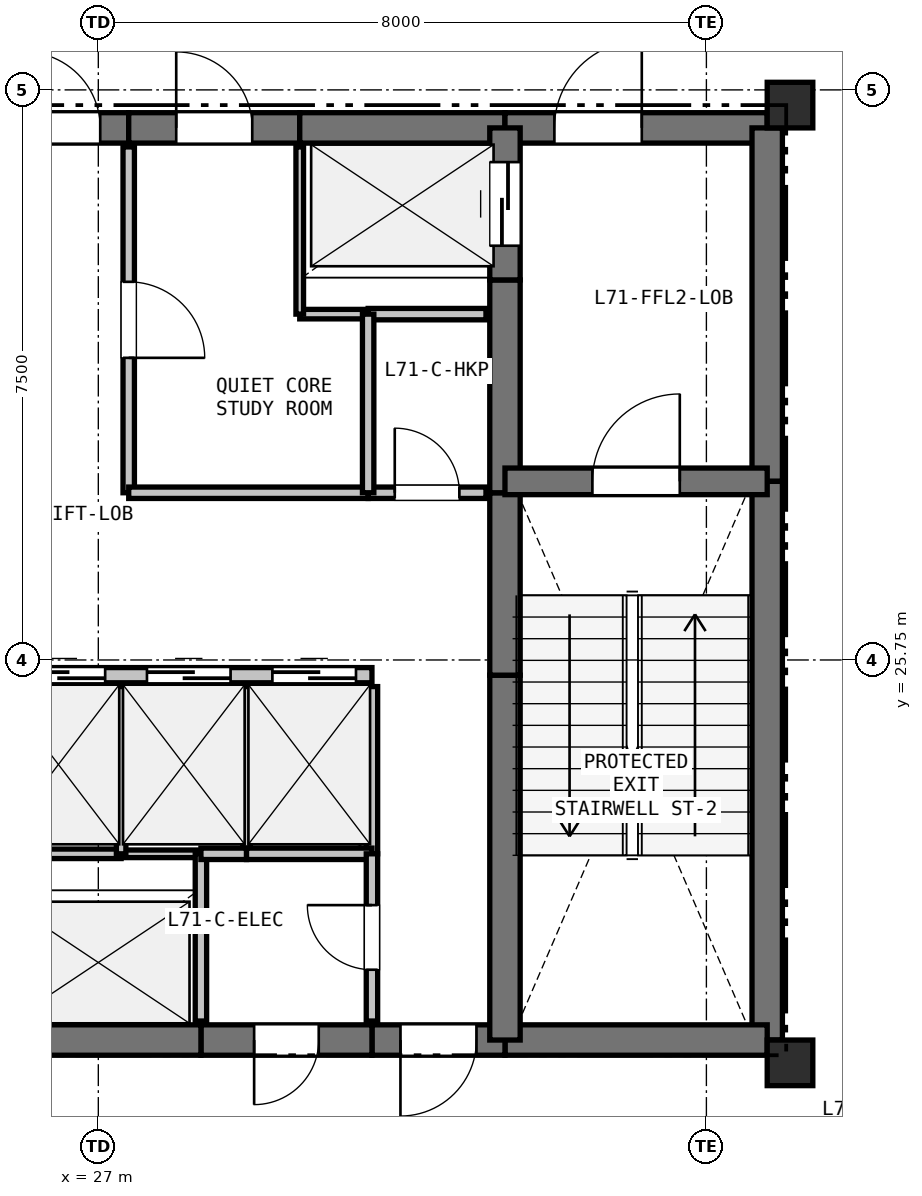
"""IFC4 building model, lengths in metres.
Left out: names, types, materials, properties, quantities, classifications, styles, units other than length and angle.
Written with IfcOpenShell. Run it as: python <this file> out.ifc"""

import sys

from ifc_helpers import new_model, si_unit, direction, frame, frame_2d, origin, origin_2d, place, context, subcontext, project, spatial, rectangle, extrude, element, fill, save


model = new_model("IFC4")
c1 = context("Model", 3, precision=1e-05, world=origin(), true_north=direction((0.0, 1.0)))
c2 = subcontext(c1, "Body", "Model", "MODEL_VIEW")
j1 = project(units=[si_unit("LENGTHUNIT", "METRE"), si_unit("PLANEANGLEUNIT", "RADIAN")], contexts=[c1])
p1 = place(None, origin())
s1 = spatial("IfcSite", under=j1, at=p1, CompositionType="ELEMENT")
p2 = place(p1, origin())
s2 = spatial("IfcBuilding", under=s1, at=p2, CompositionType="ELEMENT")
p3 = place(p2, frame((0.0, 0.0, 254.1)))
s3 = spatial("IfcBuildingStorey", under=s2, at=p3, CompositionType="ELEMENT", Elevation=254.1)
for number, where, z_axis, x_axis in (
    (1, (36.1, 33.05, 0.0), (0.0, 0.0, 1.0), (1.0, 0.0, 0.0)),
    (2, (36.1, 20.45, 0.0), (0.0, 0.0, 1.0), (1.0, 0.0, 0.0)),
):
    element("IfcColumn", number, at=place(p3, frame(where, z_axis=z_axis, x_axis=x_axis)), inside=s3, PredefinedType="COLUMN", context=c2, shape_type="SweptSolid", body=[
        extrude(rectangle(XDim=0.6, YDim=0.6, at=origin_2d()), origin(), (0.0, 0.0, 1.0), 4.5),
    ])
p4 = place(p3, frame((25.65, 32.75, 0.0), z_axis=(0.0, 0.0, 1.0), x_axis=(1.0, 0.0, 0.0)))
e3 = element("IfcWall", 3, at=p4, inside=s3, PredefinedType="SHEAR", context=c2, shape_type="SweptSolid", body=[
    extrude(rectangle(XDim=1.75, YDim=0.4, at=frame_2d((0.875, 0.0))), origin(), (0.0, 0.0, 1.0), 4.18),
])
p5 = place(p4, frame((0.375, 0.0, 0.0)))
e4 = element("IfcOpeningElement", 4, at=p5, cuts=e3, PredefinedType="OPENING", context=c2, shape_type="SweptSolid", body=[
    extrude(rectangle(XDim=1.0, YDim=2.15, at=frame_2d((0.5, 1.075))), frame((0.0, 0.21, 0.0), z_axis=(0.0, -1.0, 0.0), x_axis=(1.0, 0.0, 0.0)), (0.0, 0.0, 1.0), 0.42),
])
p6 = place(p3, frame((27.4, 32.75, 0.0), z_axis=(0.0, 0.0, 1.0), x_axis=(1.0, 0.0, 0.0)))
e5 = element("IfcWall", 5, at=p6, inside=s3, PredefinedType="SHEAR", context=c2, shape_type="SweptSolid", body=[
    extrude(rectangle(XDim=2.25, YDim=0.4, at=frame_2d((1.125, 0.0))), origin(), (0.0, 0.0, 1.0), 4.18),
])
p7 = place(p6, frame((0.625, 0.0, 0.0)))
e6 = element("IfcOpeningElement", 6, at=p7, cuts=e5, PredefinedType="OPENING", context=c2, shape_type="SweptSolid", body=[
    extrude(rectangle(XDim=1.0, YDim=2.15, at=frame_2d((0.5, 1.075))), frame((0.0, 0.21, 0.0), z_axis=(0.0, -1.0, 0.0), x_axis=(1.0, 0.0, 0.0)), (0.0, 0.0, 1.0), 0.42),
])
p8 = place(p3, frame((29.65, 32.75, 0.0), z_axis=(0.0, 0.0, 1.0), x_axis=(1.0, 0.0, 0.0)))
e7 = element("IfcWall", 7, at=p8, inside=s3, PredefinedType="SHEAR", context=c2, shape_type="SweptSolid", body=[
    extrude(rectangle(XDim=2.7, YDim=0.4, at=frame_2d((1.35, 0.0))), origin(), (0.0, 0.0, 1.0), 4.18),
])
p9 = place(p3, frame((32.35, 32.75, 0.0), z_axis=(0.0, 0.0, 1.0), x_axis=(1.0, 0.0, 0.0)))
e8 = element("IfcWall", 8, at=p9, inside=s3, PredefinedType="SHEAR", context=c2, shape_type="SweptSolid", body=[
    extrude(rectangle(XDim=3.45, YDim=0.4, at=frame_2d((1.725, 0.0))), origin(), (0.0, 0.0, 1.0), 4.18),
])
p10 = place(p9, frame((0.65, 0.0, 0.0)))
e9 = element("IfcOpeningElement", 9, at=p10, cuts=e8, PredefinedType="OPENING", context=c2, shape_type="SweptSolid", body=[
    extrude(rectangle(XDim=1.15, YDim=2.15, at=frame_2d((0.575, 1.075))), frame((0.0, 0.21, 0.0), z_axis=(0.0, -1.0, 0.0), x_axis=(1.0, 0.0, 0.0)), (0.0, 0.0, 1.0), 0.42),
])
p11 = place(p3, frame((35.8, 32.75, 0.0), z_axis=(0.0, 0.0, 1.0), x_axis=(0.0, -1.0, 0.0)))
e10 = element("IfcWall", 10, at=p11, inside=s3, PredefinedType="SHEAR", context=c2, shape_type="SweptSolid", body=[
    extrude(rectangle(XDim=4.65, YDim=0.4, at=frame_2d((2.325, 0.0))), origin(), (0.0, 0.0, 1.0), 4.18),
])
p12 = place(p3, frame((35.8, 28.1, 0.0), z_axis=(0.0, 0.0, 1.0), x_axis=(0.0, -1.0, 0.0)))
e11 = element("IfcWall", 11, at=p12, inside=s3, PredefinedType="SHEAR", context=c2, shape_type="SweptSolid", body=[
    extrude(rectangle(XDim=7.35, YDim=0.4, at=frame_2d((3.675, 0.0))), origin(), (0.0, 0.0, 1.0), 4.18),
])
p13 = place(p3, frame((35.8, 20.75, 0.0), z_axis=(0.0, 0.0, 1.0), x_axis=(-1.0, 0.0, 0.0)))
e12 = element("IfcWall", 12, at=p13, inside=s3, PredefinedType="SHEAR", context=c2, shape_type="SweptSolid", body=[
    extrude(rectangle(XDim=3.45, YDim=0.4, at=frame_2d((1.725, 0.0))), origin(), (0.0, 0.0, 1.0), 4.18),
])
p14 = place(p3, frame((32.35, 20.75, 0.0), z_axis=(0.0, 0.0, 1.0), x_axis=(-1.0, 0.0, 0.0)))
e13 = element("IfcWall", 13, at=p14, inside=s3, PredefinedType="SHEAR", context=c2, shape_type="SweptSolid", body=[
    extrude(rectangle(XDim=1.75, YDim=0.4, at=frame_2d((0.875, 0.0))), origin(), (0.0, 0.0, 1.0), 4.18),
])
p15 = place(p14, frame((0.375, 0.0, 0.0)))
e14 = element("IfcOpeningElement", 14, at=p15, cuts=e13, PredefinedType="OPENING", context=c2, shape_type="SweptSolid", body=[
    extrude(rectangle(XDim=1.0, YDim=2.15, at=frame_2d((0.5, 1.075))), frame((0.0, 0.21, 0.0), z_axis=(0.0, -1.0, 0.0), x_axis=(1.0, 0.0, 0.0)), (0.0, 0.0, 1.0), 0.42),
])
p16 = place(p3, frame((30.6, 20.75, 0.0), z_axis=(0.0, 0.0, 1.0), x_axis=(-1.0, 0.0, 0.0)))
e15 = element("IfcWall", 15, at=p16, inside=s3, PredefinedType="SHEAR", context=c2, shape_type="SweptSolid", body=[
    extrude(rectangle(XDim=2.25, YDim=0.4, at=frame_2d((1.125, 0.0))), origin(), (0.0, 0.0, 1.0), 4.18),
])
p17 = place(p16, frame((0.7, 0.0, 0.0)))
e16 = element("IfcOpeningElement", 16, at=p17, cuts=e15, PredefinedType="OPENING", context=c2, shape_type="SweptSolid", body=[
    extrude(rectangle(XDim=0.85, YDim=2.1, at=frame_2d((0.425, 1.05))), frame((0.0, 0.21, 0.0), z_axis=(0.0, -1.0, 0.0), x_axis=(1.0, 0.0, 0.0)), (0.0, 0.0, 1.0), 0.42),
])
p18 = place(p3, frame((28.35, 20.75, 0.0), z_axis=(0.0, 0.0, 1.0), x_axis=(-1.0, 0.0, 0.0)))
e17 = element("IfcWall", 17, at=p18, inside=s3, PredefinedType="SHEAR", context=c2, shape_type="SweptSolid", body=[
    extrude(rectangle(XDim=2.7, YDim=0.4, at=frame_2d((1.35, 0.0))), origin(), (0.0, 0.0, 1.0), 4.18),
])
p19 = place(p3, frame((32.35, 20.75, 0.0), z_axis=(0.0, 0.0, 1.0), x_axis=(0.0, 1.0, 0.0)))
e18 = element("IfcWall", 18, at=p19, inside=s3, PredefinedType="SHEAR", context=c2, shape_type="SweptSolid", body=[
    extrude(rectangle(XDim=4.8, YDim=0.4, at=frame_2d((2.4, 0.0))), origin(), (0.0, 0.0, 1.0), 4.18),
])
p20 = place(p3, frame((32.35, 25.55, 0.0), z_axis=(0.0, 0.0, 1.0), x_axis=(0.0, 1.0, 0.0)))
e19 = element("IfcWall", 19, at=p20, inside=s3, PredefinedType="SHEAR", context=c2, shape_type="SweptSolid", body=[
    extrude(rectangle(XDim=2.4, YDim=0.4, at=frame_2d((1.2, 0.0))), origin(), (0.0, 0.0, 1.0), 4.18),
])
p21 = place(p3, frame((32.35, 27.95, 0.0), z_axis=(0.0, 0.0, 1.0), x_axis=(0.0, 1.0, 0.0)))
e20 = element("IfcWall", 20, at=p21, inside=s3, PredefinedType="SHEAR", context=c2, shape_type="SweptSolid", body=[
    extrude(rectangle(XDim=2.8, YDim=0.4, at=frame_2d((1.4, 0.0))), origin(), (0.0, 0.0, 1.0), 4.18),
])
p22 = place(p3, frame((32.35, 30.75, 0.0), z_axis=(0.0, 0.0, 1.0), x_axis=(0.0, 1.0, 0.0)))
e21 = element("IfcWall", 21, at=p22, inside=s3, PredefinedType="SHEAR", context=c2, shape_type="SweptSolid", body=[
    extrude(rectangle(XDim=2.0, YDim=0.4, at=frame_2d((1.0, 0.0))), origin(), (0.0, 0.0, 1.0), 4.18),
])
p23 = place(p22, frame((0.45, 0.0, 0.0)))
e22 = element("IfcOpeningElement", 22, at=p23, cuts=e21, PredefinedType="OPENING", context=c2, shape_type="SweptSolid", body=[
    extrude(rectangle(XDim=1.1, YDim=2.15, at=frame_2d((0.55, 1.075))), frame((0.0, 0.21, 0.0), z_axis=(0.0, -1.0, 0.0), x_axis=(1.0, 0.0, 0.0)), (0.0, 0.0, 1.0), 0.42),
])
p24 = place(p3, frame((32.35, 28.1, 0.0), z_axis=(0.0, 0.0, 1.0), x_axis=(1.0, 0.0, 0.0)))
e23 = element("IfcWall", 23, at=p24, inside=s3, PredefinedType="SHEAR", context=c2, shape_type="SweptSolid", body=[
    extrude(rectangle(XDim=3.45, YDim=0.35, at=frame_2d((1.725, 0.0))), origin(), (0.0, 0.0, 1.0), 4.18),
])
p25 = place(p24, frame((1.15, 0.0, 0.0)))
e24 = element("IfcOpeningElement", 24, at=p25, cuts=e23, PredefinedType="OPENING", context=c2, shape_type="SweptSolid", body=[
    extrude(rectangle(XDim=1.15, YDim=2.15, at=frame_2d((0.575, 1.075))), frame((0.0, 0.185, 0.0), z_axis=(0.0, -1.0, 0.0), x_axis=(1.0, 0.0, 0.0)), (0.0, 0.0, 1.0), 0.37),
])
p26 = place(p3, frame((25.65, 25.55, 0.0), z_axis=(0.0, 0.0, 1.0), x_axis=(1.0, 0.0, 0.0)))
e25 = element("IfcWall", 25, at=p26, inside=s3, PredefinedType="PARTITIONING", context=c2, shape_type="SweptSolid", body=[
    extrude(rectangle(XDim=4.95, YDim=0.2, at=frame_2d((2.475, 0.0))), origin(), (0.0, 0.0, 1.0), 4.18),
])
p27 = place(p26, frame((0.34, 0.0, 0.0)))
e26 = element("IfcOpeningElement", 26, at=p27, cuts=e25, PredefinedType="OPENING", context=c2, shape_type="SweptSolid", body=[
    extrude(rectangle(XDim=1.1, YDim=2.15, at=frame_2d((0.55, 1.075))), frame((0.0, 0.11, 0.0), z_axis=(0.0, -1.0, 0.0), x_axis=(1.0, 0.0, 0.0)), (0.0, 0.0, 1.0), 0.22),
])
p28 = place(p26, frame((1.99, 0.0, 0.0)))
e27 = element("IfcOpeningElement", 27, at=p28, cuts=e25, PredefinedType="OPENING", context=c2, shape_type="SweptSolid", body=[
    extrude(rectangle(XDim=1.1, YDim=2.15, at=frame_2d((0.55, 1.075))), frame((0.0, 0.11, 0.0), z_axis=(0.0, -1.0, 0.0), x_axis=(1.0, 0.0, 0.0)), (0.0, 0.0, 1.0), 0.22),
])
p29 = place(p26, frame((3.64, 0.0, 0.0)))
e28 = element("IfcOpeningElement", 28, at=p29, cuts=e25, PredefinedType="OPENING", context=c2, shape_type="SweptSolid", body=[
    extrude(rectangle(XDim=1.1, YDim=2.15, at=frame_2d((0.55, 1.075))), frame((0.0, 0.11, 0.0), z_axis=(0.0, -1.0, 0.0), x_axis=(1.0, 0.0, 0.0)), (0.0, 0.0, 1.0), 0.22),
])
p30 = place(p3, frame((25.9, 23.2, 0.0), z_axis=(0.0, 0.0, 1.0), x_axis=(1.0, 0.0, 0.0)))
e29 = element("IfcWall", 29, at=p30, inside=s3, PredefinedType="PARTITIONING", context=c2, shape_type="SweptSolid", body=[
    extrude(rectangle(XDim=1.4, YDim=0.125, at=frame_2d((0.7, 0.0))), origin(), (0.0, 0.0, 1.0), 4.18),
])
p31 = place(p3, frame((27.3, 23.2, 0.0), z_axis=(0.0, 0.0, 1.0), x_axis=(1.0, 0.0, 0.0)))
e30 = element("IfcWall", 30, at=p31, inside=s3, PredefinedType="PARTITIONING", context=c2, shape_type="SweptSolid", body=[
    extrude(rectangle(XDim=1.05, YDim=0.1, at=frame_2d((0.525, 0.0))), origin(), (0.0, 0.0, 1.0), 4.18),
])
p32 = place(p3, frame((28.35, 23.2, 0.0), z_axis=(0.0, 0.0, 1.0), x_axis=(0.0, -1.0, 0.0)))
e31 = element("IfcWall", 31, at=p32, inside=s3, PredefinedType="PARTITIONING", context=c2, shape_type="SweptSolid", body=[
    extrude(rectangle(XDim=2.2, YDim=0.15, at=frame_2d((1.1, 0.0))), origin(), (0.0, 0.0, 1.0), 4.18),
])
p33 = place(p3, frame((32.1, 30.3, 0.0), z_axis=(0.0, 0.0, 1.0), x_axis=(-1.0, 0.0, 0.0)))
e32 = element("IfcWall", 32, at=p33, inside=s3, PredefinedType="PARTITIONING", context=c2, shape_type="SweptSolid", body=[
    extrude(rectangle(XDim=1.55, YDim=0.15, at=frame_2d((0.775, 0.0))), origin(), (0.0, 0.0, 1.0), 4.18),
])
p34 = place(p3, frame((30.55, 30.3, 0.0), z_axis=(0.0, 0.0, 1.0), x_axis=(-1.0, 0.0, 0.0)))
e33 = element("IfcWall", 33, at=p34, inside=s3, PredefinedType="PARTITIONING", context=c2, shape_type="SweptSolid", body=[
    extrude(rectangle(XDim=0.9, YDim=0.125, at=frame_2d((0.45, 0.0))), origin(), (0.0, 0.0, 1.0), 4.18),
])
p35 = place(p3, frame((29.65, 30.3, 0.0), z_axis=(0.0, 0.0, 1.0), x_axis=(0.0, 1.0, 0.0)))
e34 = element("IfcWall", 34, at=p35, inside=s3, PredefinedType="PARTITIONING", context=c2, shape_type="SweptSolid", body=[
    extrude(rectangle(XDim=2.2, YDim=0.1, at=frame_2d((1.1, 0.0))), origin(), (0.0, 0.0, 1.0), 4.18),
])
p36 = place(p3, frame((27.3, 25.4, 0.0), z_axis=(0.0, 0.0, 1.0), x_axis=(0.0, -1.0, 0.0)))
e35 = element("IfcWall", 35, at=p36, inside=s3, PredefinedType="PARTITIONING", context=c2, shape_type="SweptSolid", body=[
    extrude(rectangle(XDim=2.2, YDim=0.125, at=frame_2d((1.1, 0.0))), origin(), (0.0, 0.0, 1.0), 4.18),
])
p37 = place(p3, frame((28.95, 25.4, 0.0), z_axis=(0.0, 0.0, 1.0), x_axis=(0.0, -1.0, 0.0)))
e36 = element("IfcWall", 36, at=p37, inside=s3, PredefinedType="PARTITIONING", context=c2, shape_type="SweptSolid", body=[
    extrude(rectangle(XDim=2.2, YDim=0.1, at=frame_2d((1.1, 0.0))), origin(), (0.0, 0.0, 1.0), 4.18),
])
p38 = place(p3, frame((28.95, 23.2, 0.0), z_axis=(0.0, 0.0, 1.0), x_axis=(-1.0, 0.0, 0.0)))
e37 = element("IfcWall", 37, at=p38, inside=s3, PredefinedType="PARTITIONING", context=c2, shape_type="SweptSolid", body=[
    extrude(rectangle(XDim=0.6, YDim=0.15, at=frame_2d((0.3, 0.0))), origin(), (0.0, 0.0, 1.0), 4.18),
])
p39 = place(p3, frame((30.6, 25.4, 0.0), z_axis=(0.0, 0.0, 1.0), x_axis=(0.0, -1.0, 0.0)))
e38 = element("IfcWall", 38, at=p39, inside=s3, PredefinedType="PARTITIONING", context=c2, shape_type="SweptSolid", body=[
    extrude(rectangle(XDim=2.2, YDim=0.15, at=frame_2d((1.1, 0.0))), origin(), (0.0, 0.0, 1.0), 4.18),
])
p40 = place(p3, frame((30.6, 23.2, 0.0), z_axis=(0.0, 0.0, 1.0), x_axis=(-1.0, 0.0, 0.0)))
e39 = element("IfcWall", 39, at=p40, inside=s3, PredefinedType="PARTITIONING", context=c2, shape_type="SweptSolid", body=[
    extrude(rectangle(XDim=1.65, YDim=0.15, at=frame_2d((0.825, 0.0))), origin(), (0.0, 0.0, 1.0), 4.18),
])
p41 = place(p3, frame((30.6, 21.0, 0.0), z_axis=(0.0, 0.0, 1.0), x_axis=(0.0, 1.0, 0.0)))
e40 = element("IfcWall", 40, at=p41, inside=s3, PredefinedType="PARTITIONING", context=c2, shape_type="SweptSolid", body=[
    extrude(rectangle(XDim=2.2, YDim=0.15, at=frame_2d((1.1, 0.0))), origin(), (0.0, 0.0, 1.0), 4.18),
])
p42 = place(p41, frame((0.675, 0.0, 0.0)))
e41 = element("IfcOpeningElement", 41, at=p42, cuts=e40, PredefinedType="OPENING", context=c2, shape_type="SweptSolid", body=[
    extrude(rectangle(XDim=0.85, YDim=2.1, at=frame_2d((0.425, 1.05))), frame((0.0, 0.085, 0.0), z_axis=(0.0, -1.0, 0.0), x_axis=(1.0, 0.0, 0.0)), (0.0, 0.0, 1.0), 0.17),
])
p43 = place(p3, frame((27.4, 32.5, 0.0), z_axis=(0.0, 0.0, 1.0), x_axis=(0.0, -1.0, 0.0)))
e42 = element("IfcWall", 42, at=p43, inside=s3, PredefinedType="PARTITIONING", context=c2, shape_type="SweptSolid", body=[
    extrude(rectangle(XDim=4.55, YDim=0.15, at=frame_2d((2.275, 0.0))), origin(), (0.0, 0.0, 1.0), 4.18),
])
p44 = place(p43, frame((1.775, 0.0, 0.0)))
e43 = element("IfcOpeningElement", 43, at=p44, cuts=e42, PredefinedType="OPENING", context=c2, shape_type="SweptSolid", body=[
    extrude(rectangle(XDim=1.0, YDim=2.15, at=frame_2d((0.5, 1.075))), frame((0.0, 0.085, 0.0), z_axis=(0.0, -1.0, 0.0), x_axis=(1.0, 0.0, 0.0)), (0.0, 0.0, 1.0), 0.17),
])
p45 = place(p3, frame((27.4, 27.95, 0.0), z_axis=(0.0, 0.0, 1.0), x_axis=(1.0, 0.0, 0.0)))
e44 = element("IfcWall", 44, at=p45, inside=s3, PredefinedType="PARTITIONING", context=c2, shape_type="SweptSolid", body=[
    extrude(rectangle(XDim=3.15, YDim=0.15, at=frame_2d((1.575, 0.0))), origin(), (0.0, 0.0, 1.0), 4.18),
])
p46 = place(p3, frame((30.55, 27.95, 0.0), z_axis=(0.0, 0.0, 1.0), x_axis=(1.0, 0.0, 0.0)))
e45 = element("IfcWall", 45, at=p46, inside=s3, PredefinedType="PARTITIONING", context=c2, shape_type="SweptSolid", body=[
    extrude(rectangle(XDim=1.55, YDim=0.15, at=frame_2d((0.775, 0.0))), origin(), (0.0, 0.0, 1.0), 4.18),
])
p47 = place(p46, frame((0.35, 0.0, 0.0)))
e46 = element("IfcOpeningElement", 46, at=p47, cuts=e45, PredefinedType="OPENING", context=c2, shape_type="SweptSolid", body=[
    extrude(rectangle(XDim=0.85, YDim=2.1, at=frame_2d((0.425, 1.05))), frame((0.0, 0.085, 0.0), z_axis=(0.0, -1.0, 0.0), x_axis=(1.0, 0.0, 0.0)), (0.0, 0.0, 1.0), 0.17),
])
p48 = place(p3, frame((30.55, 30.3, 0.0), z_axis=(0.0, 0.0, 1.0), x_axis=(0.0, -1.0, 0.0)))
e47 = element("IfcWall", 47, at=p48, inside=s3, PredefinedType="PARTITIONING", context=c2, shape_type="SweptSolid", body=[
    extrude(rectangle(XDim=2.35, YDim=0.15, at=frame_2d((1.175, 0.0))), origin(), (0.0, 0.0, 1.0), 4.18),
])
p49 = place(p27, origin())
e48 = element("IfcDoor", 48, at=p49, inside=s3, OperationType="SLIDING_TO_LEFT", PredefinedType="DOOR", context=c2, shape_type="SweptSolid", body=[
    extrude(rectangle(XDim=1.1, YDim=2.15, at=frame_2d((0.55, 1.075))), frame((0.0, 0.025, 0.0), z_axis=(0.0, -1.0, 0.0), x_axis=(1.0, 0.0, 0.0)), (0.0, 0.0, 1.0), 0.05),
])
fill(e26, e48)
p50 = place(p28, origin())
e49 = element("IfcDoor", 49, at=p50, inside=s3, OperationType="SLIDING_TO_LEFT", PredefinedType="DOOR", context=c2, shape_type="SweptSolid", body=[
    extrude(rectangle(XDim=1.1, YDim=2.15, at=frame_2d((0.55, 1.075))), frame((0.0, 0.025, 0.0), z_axis=(0.0, -1.0, 0.0), x_axis=(1.0, 0.0, 0.0)), (0.0, 0.0, 1.0), 0.05),
])
fill(e27, e49)
p51 = place(p29, origin())
e50 = element("IfcDoor", 50, at=p51, inside=s3, OperationType="SLIDING_TO_LEFT", PredefinedType="DOOR", context=c2, shape_type="SweptSolid", body=[
    extrude(rectangle(XDim=1.1, YDim=2.15, at=frame_2d((0.55, 1.075))), frame((0.0, 0.025, 0.0), z_axis=(0.0, -1.0, 0.0), x_axis=(1.0, 0.0, 0.0)), (0.0, 0.0, 1.0), 0.05),
])
fill(e28, e50)
p52 = place(p5, origin())
e51 = element("IfcDoor", 51, at=p52, inside=s3, OperationType="SINGLE_SWING_LEFT", PredefinedType="DOOR", context=c2, shape_type="SweptSolid", body=[
    extrude(rectangle(XDim=1.0, YDim=2.15, at=frame_2d((0.5, 1.075))), frame((0.0, 0.025, 0.0), z_axis=(0.0, -1.0, 0.0), x_axis=(1.0, 0.0, 0.0)), (0.0, 0.0, 1.0), 0.05),
])
fill(e4, e51)
p53 = place(p15, origin())
e52 = element("IfcDoor", 52, at=p53, inside=s3, OperationType="SINGLE_SWING_RIGHT", PredefinedType="DOOR", context=c2, shape_type="SweptSolid", body=[
    extrude(rectangle(XDim=1.0, YDim=2.15, at=frame_2d((0.5, 1.075))), frame((0.0, 0.025, 0.0), z_axis=(0.0, -1.0, 0.0), x_axis=(1.0, 0.0, 0.0)), (0.0, 0.0, 1.0), 0.05),
])
fill(e14, e52)
p54 = place(p23, origin())
e53 = element("IfcDoor", 53, at=p54, inside=s3, OperationType="SLIDING_TO_LEFT", PredefinedType="DOOR", context=c2, shape_type="SweptSolid", body=[
    extrude(rectangle(XDim=1.1, YDim=2.15, at=frame_2d((0.55, 1.075))), frame((0.0, 0.025, 0.0), z_axis=(0.0, -1.0, 0.0), x_axis=(1.0, 0.0, 0.0)), (0.0, 0.0, 1.0), 0.05),
])
fill(e22, e53)
p55 = place(p25, origin())
e54 = element("IfcDoor", 54, at=p55, inside=s3, OperationType="SINGLE_SWING_RIGHT", PredefinedType="DOOR", context=c2, shape_type="SweptSolid", body=[
    extrude(rectangle(XDim=1.15, YDim=2.15, at=frame_2d((0.575, 1.075))), frame((0.0, 0.025, 0.0), z_axis=(0.0, -1.0, 0.0), x_axis=(1.0, 0.0, 0.0)), (0.0, 0.0, 1.0), 0.05),
])
fill(e24, e54)
p56 = place(p10, origin())
e55 = element("IfcDoor", 55, at=p56, inside=s3, OperationType="SINGLE_SWING_RIGHT", PredefinedType="DOOR", context=c2, shape_type="SweptSolid", body=[
    extrude(rectangle(XDim=1.15, YDim=2.15, at=frame_2d((0.575, 1.075))), frame((0.0, 0.025, 0.0), z_axis=(0.0, -1.0, 0.0), x_axis=(1.0, 0.0, 0.0)), (0.0, 0.0, 1.0), 0.05),
])
fill(e9, e55)
p57 = place(p44, origin())
e56 = element("IfcDoor", 56, at=p57, inside=s3, OperationType="SINGLE_SWING_RIGHT", PredefinedType="DOOR", context=c2, shape_type="SweptSolid", body=[
    extrude(rectangle(XDim=1.0, YDim=2.15, at=frame_2d((0.5, 1.075))), frame((0.0, 0.025, 0.0), z_axis=(0.0, -1.0, 0.0), x_axis=(1.0, 0.0, 0.0)), (0.0, 0.0, 1.0), 0.05),
])
fill(e43, e56)
p58 = place(p47, origin())
e57 = element("IfcDoor", 57, at=p58, inside=s3, OperationType="SINGLE_SWING_LEFT", PredefinedType="DOOR", context=c2, shape_type="SweptSolid", body=[
    extrude(rectangle(XDim=0.85, YDim=2.1, at=frame_2d((0.425, 1.05))), frame((0.0, 0.025, 0.0), z_axis=(0.0, -1.0, 0.0), x_axis=(1.0, 0.0, 0.0)), (0.0, 0.0, 1.0), 0.05),
])
fill(e46, e57)
p59 = place(p42, origin())
e58 = element("IfcDoor", 58, at=p59, inside=s3, OperationType="SINGLE_SWING_RIGHT", PredefinedType="DOOR", context=c2, shape_type="SweptSolid", body=[
    extrude(rectangle(XDim=0.85, YDim=2.1, at=frame_2d((0.425, 1.05))), frame((0.0, 0.025, 0.0), z_axis=(0.0, -1.0, 0.0), x_axis=(1.0, 0.0, 0.0)), (0.0, 0.0, 1.0), 0.05),
])
fill(e41, e58)
p60 = place(p7, origin())
e59 = element("IfcDoor", 59, at=p60, inside=s3, OperationType="SINGLE_SWING_LEFT", PredefinedType="DOOR", context=c2, shape_type="SweptSolid", body=[
    extrude(rectangle(XDim=1.0, YDim=2.15, at=frame_2d((0.5, 1.075))), frame((0.0, 0.025, 0.0), z_axis=(0.0, -1.0, 0.0), x_axis=(1.0, 0.0, 0.0)), (0.0, 0.0, 1.0), 0.05),
])
fill(e6, e59)
p61 = place(p17, origin())
e60 = element("IfcDoor", 60, at=p61, inside=s3, OperationType="SINGLE_SWING_RIGHT", PredefinedType="DOOR", context=c2, shape_type="SweptSolid", body=[
    extrude(rectangle(XDim=0.85, YDim=2.1, at=frame_2d((0.425, 1.05))), frame((0.0, 0.025, 0.0), z_axis=(0.0, -1.0, 0.0), x_axis=(1.0, 0.0, 0.0)), (0.0, 0.0, 1.0), 0.05),
])
fill(e16, e60)
save(model, sys.argv[1])
